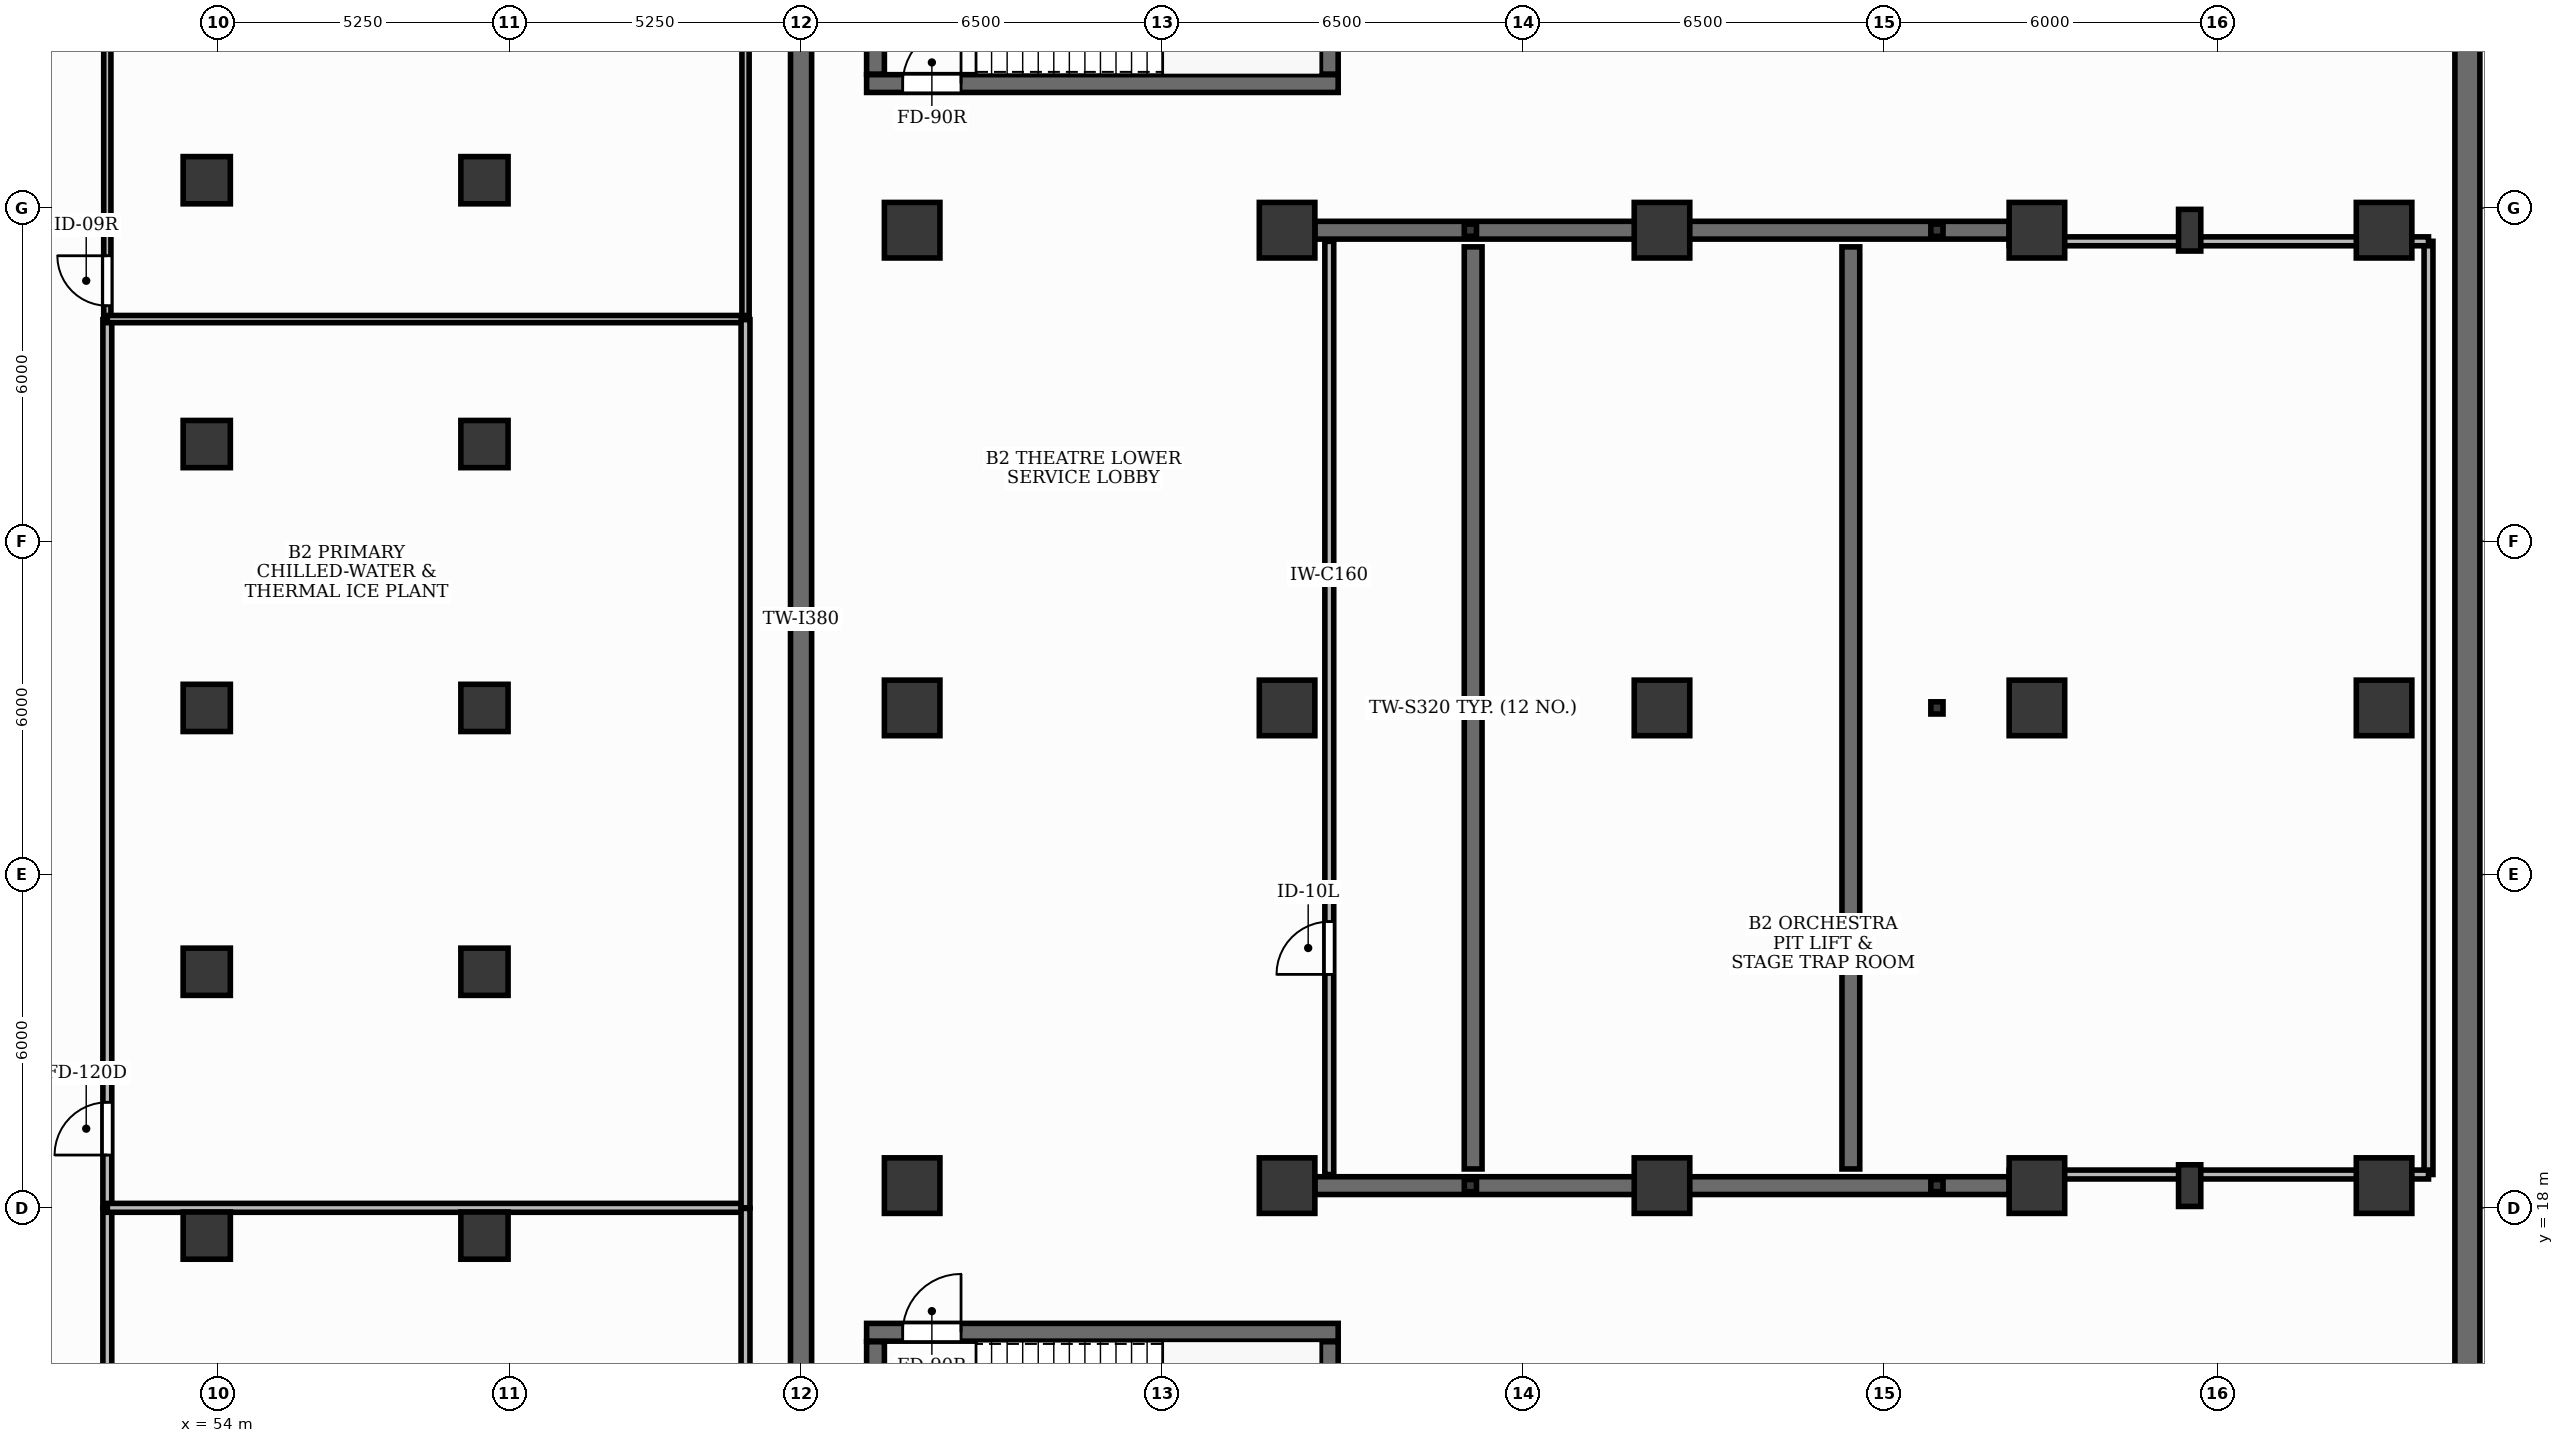
"""IFC4 building model, lengths in metres.
Left out: names, types, materials, properties, quantities, classifications, styles, units other than length and angle.
Written with IfcOpenShell. Run it as: python <this file> out.ifc"""

import sys

from ifc_helpers import new_model, si_unit, direction, frame, frame_2d, origin, origin_2d, place, context, subcontext, project, spatial, rectangle, hollow_circle, i_section, extrude, element, fill, save


model = new_model("IFC4")
c1 = context("Model", 3, precision=1e-05, world=origin(), true_north=direction((0.0, 1.0)))
c2 = subcontext(c1, "Body", "Model", "MODEL_VIEW")
j1 = project(units=[si_unit("LENGTHUNIT", "METRE"), si_unit("PLANEANGLEUNIT", "RADIAN")], contexts=[c1])
p1 = place(None, origin())
s1 = spatial("IfcSite", under=j1, at=p1, CompositionType="ELEMENT")
p2 = place(p1, origin())
s2 = spatial("IfcBuilding", under=s1, at=p2, CompositionType="ELEMENT")
p3 = place(p2, frame((0.0, 0.0, -9.0)))
s3 = spatial("IfcBuildingStorey", under=s2, at=p3, CompositionType="ELEMENT", Elevation=-9.0)
p4 = place(p3, frame((94.5, 50.75, 0.0), z_axis=(0.0, 0.0, 1.0), x_axis=(0.0, -1.0, 0.0)))
e1 = element("IfcWall", 1, at=p4, inside=s3, PredefinedType="USERDEFINED", context=c2, shape_type="SweptSolid", body=[
    extrude(rectangle(XDim=47.5, YDim=0.45, at=frame_2d((23.75, 0.0))), origin(), (0.0, 0.0, 1.0), 4.18),
])
for number, where, z_axis, x_axis in (
    (2, (66.5, 18.4, 0.0), (0.0, 0.0, 1.0), (1.0, 0.0, 0.0)),
    (3, (66.5, 27.0, 0.0), (0.0, 0.0, 1.0), (1.0, 0.0, 0.0)),
    (4, (66.5, 35.6, 0.0), (0.0, 0.0, 1.0), (1.0, 0.0, 0.0)),
    (5, (73.25, 18.4, 0.0), (0.0, 0.0, 1.0), (1.0, 0.0, 0.0)),
    (6, (73.25, 27.0, 0.0), (0.0, 0.0, 1.0), (1.0, 0.0, 0.0)),
    (7, (73.25, 35.6, 0.0), (0.0, 0.0, 1.0), (1.0, 0.0, 0.0)),
    (8, (80.0, 18.4, 0.0), (0.0, 0.0, 1.0), (1.0, 0.0, 0.0)),
    (9, (80.0, 27.0, 0.0), (0.0, 0.0, 1.0), (1.0, 0.0, 0.0)),
    (10, (80.0, 35.6, 0.0), (0.0, 0.0, 1.0), (1.0, 0.0, 0.0)),
    (11, (86.75, 18.4, 0.0), (0.0, 0.0, 1.0), (1.0, 0.0, 0.0)),
    (12, (86.75, 27.0, 0.0), (0.0, 0.0, 1.0), (1.0, 0.0, 0.0)),
    (13, (86.75, 35.6, 0.0), (0.0, 0.0, 1.0), (1.0, 0.0, 0.0)),
    (14, (93.0, 18.4, 0.0), (0.0, 0.0, 1.0), (1.0, 0.0, 0.0)),
    (15, (93.0, 27.0, 0.0), (0.0, 0.0, 1.0), (1.0, 0.0, 0.0)),
    (16, (93.0, 35.6, 0.0), (0.0, 0.0, 1.0), (1.0, 0.0, 0.0)),
):
    element("IfcColumn", number, at=place(p3, frame(where, z_axis=z_axis, x_axis=x_axis)), inside=s3, PredefinedType="COLUMN", context=c2, shape_type="SweptSolid", body=[
        extrude(rectangle(XDim=1.0, YDim=1.0, at=origin_2d()), origin(), (0.0, 0.0, 1.0), 4.18),
    ])
for number, where, z_axis, x_axis in (
    (17, (89.5, 18.4, 0.0), (0.0, 0.0, 1.0), (1.0, 0.0, 0.0)),
    (18, (89.5, 35.6, 0.0), (0.0, 0.0, 1.0), (1.0, 0.0, 0.0)),
):
    element("IfcColumn", number, at=place(p3, frame(where, z_axis=z_axis, x_axis=x_axis)), inside=s3, PredefinedType="COLUMN", context=c2, shape_type="SweptSolid", body=[
        extrude(i_section(OverallWidth=0.4, OverallDepth=0.75, WebThickness=0.016, FlangeThickness=0.028, at=origin_2d()), origin(), (0.0, 0.0, 1.0), 4.18),
    ])
for number, where, z_axis, x_axis in (
    (19, (84.95, 18.4, 0.0), (0.0, 0.0, 1.0), (1.0, 0.0, 0.0)),
    (20, (76.55, 18.4, 0.0), (0.0, 0.0, 1.0), (1.0, 0.0, 0.0)),
    (21, (84.95, 27.0, 0.0), (0.0, 0.0, 1.0), (1.0, 0.0, 0.0)),
    (22, (76.55, 27.0, 0.0), (0.0, 0.0, 1.0), (1.0, 0.0, 0.0)),
    (23, (84.95, 35.6, 0.0), (0.0, 0.0, 1.0), (1.0, 0.0, 0.0)),
    (24, (76.55, 35.6, 0.0), (0.0, 0.0, 1.0), (1.0, 0.0, 0.0)),
):
    element("IfcColumn", number, at=place(p3, frame(where, z_axis=z_axis, x_axis=x_axis)), inside=s3, PredefinedType="COLUMN", context=c2, shape_type="SweptSolid", body=[
        extrude(hollow_circle(Radius=0.11, WallThickness=0.012, at=origin_2d()), origin(), (0.0, 0.0, 1.0), 4.18),
    ])
p5 = place(p3, frame((64.5, 10.45, 0.0), z_axis=(0.0, 0.0, 1.0), x_axis=(0.0, 1.0, 0.0)))
e25 = element("IfcWall", 25, at=p5, inside=s3, PredefinedType="SHEAR", context=c2, shape_type="SweptSolid", body=[
    extrude(rectangle(XDim=36.3, YDim=0.38, at=frame_2d((18.15, 0.0))), origin(), (0.0, 0.0, 1.0), 4.18),
])
for number, where, z_axis, x_axis in (
    (26, (73.75, 18.4, 0.0), (0.0, 0.0, 1.0), (1.0, 0.0, 0.0)),
    (27, (73.75, 35.6, 0.0), (0.0, 0.0, 1.0), (1.0, 0.0, 0.0)),
):
    element("IfcWall", number, at=place(p3, frame(where, z_axis=z_axis, x_axis=x_axis)), inside=s3, PredefinedType="SHEAR", context=c2, shape_type="SweptSolid", body=[
        extrude(rectangle(XDim=12.5, YDim=0.32, at=frame_2d((6.25, 0.0))), origin(), (0.0, 0.0, 1.0), 4.18),
    ])
for number, where, z_axis, x_axis in (
    (28, (76.6, 18.7, 0.0), (0.0, 0.0, 1.0), (0.0, 1.0, 0.0)),
    (29, (83.4, 18.7, 0.0), (0.0, 0.0, 1.0), (0.0, 1.0, 0.0)),
):
    element("IfcWall", number, at=place(p3, frame(where, z_axis=z_axis, x_axis=x_axis)), inside=s3, PredefinedType="SHEAR", context=c2, shape_type="SweptSolid", body=[
        extrude(rectangle(XDim=16.6, YDim=0.32, at=frame_2d((8.3, 0.0))), origin(), (0.0, 0.0, 1.0), 4.18),
    ])
p6 = place(p3, frame((65.68, 15.76, 0.0), z_axis=(0.0, 0.0, 1.0), x_axis=(1.0, 0.0, 0.0)))
e30 = element("IfcWall", 30, at=p6, inside=s3, PredefinedType="SHEAR", context=c2, shape_type="SweptSolid", body=[
    extrude(rectangle(XDim=8.49, YDim=0.32, at=frame_2d((4.245, 0.0))), origin(), (0.0, 0.0, 1.0), 4.18),
])
p7 = place(p6, frame((0.65, 0.0, 0.0)))
e31 = element("IfcOpeningElement", 31, at=p7, cuts=e30, PredefinedType="OPENING", context=c2, shape_type="SweptSolid", body=[
    extrude(rectangle(XDim=1.05, YDim=2.15, at=frame_2d((0.525, 1.075))), frame((0.0, 0.175, 0.0), z_axis=(0.0, -1.0, 0.0), x_axis=(1.0, 0.0, 0.0)), (0.0, 0.0, 1.0), 0.35),
])
for number, where, z_axis, x_axis in (
    (32, (74.01, 12.11, 0.0), (0.0, 0.0, 1.0), (0.0, 1.0, 0.0)),
    (33, (65.84, 12.11, 0.0), (0.0, 0.0, 1.0), (0.0, 1.0, 0.0)),
):
    element("IfcWall", number, at=place(p3, frame(where, z_axis=z_axis, x_axis=x_axis)), inside=s3, PredefinedType="SHEAR", context=c2, shape_type="SweptSolid", body=[
        extrude(rectangle(XDim=3.48, YDim=0.32, at=frame_2d((1.74, 0.0))), origin(), (0.0, 0.0, 1.0), 4.18),
    ])
p8 = place(p3, frame((65.68, 38.24, 0.0), z_axis=(0.0, 0.0, 1.0), x_axis=(1.0, 0.0, 0.0)))
e34 = element("IfcWall", 34, at=p8, inside=s3, PredefinedType="SHEAR", context=c2, shape_type="SweptSolid", body=[
    extrude(rectangle(XDim=8.49, YDim=0.32, at=frame_2d((4.245, 0.0))), origin(), (0.0, 0.0, 1.0), 4.18),
])
p9 = place(p8, frame((0.65, 0.0, 0.0)))
e35 = element("IfcOpeningElement", 35, at=p9, cuts=e34, PredefinedType="OPENING", context=c2, shape_type="SweptSolid", body=[
    extrude(rectangle(XDim=1.05, YDim=2.15, at=frame_2d((0.525, 1.075))), frame((0.0, 0.175, 0.0), z_axis=(0.0, -1.0, 0.0), x_axis=(1.0, 0.0, 0.0)), (0.0, 0.0, 1.0), 0.35),
])
for number, where, z_axis, x_axis in (
    (36, (74.01, 38.41, 0.0), (0.0, 0.0, 1.0), (0.0, 1.0, 0.0)),
    (37, (65.84, 38.41, 0.0), (0.0, 0.0, 1.0), (0.0, 1.0, 0.0)),
):
    element("IfcWall", number, at=place(p3, frame(where, z_axis=z_axis, x_axis=x_axis)), inside=s3, PredefinedType="SHEAR", context=c2, shape_type="SweptSolid", body=[
        extrude(rectangle(XDim=3.48, YDim=0.32, at=frame_2d((1.74, 0.0))), origin(), (0.0, 0.0, 1.0), 4.18),
    ])
for number, where, z_axis, x_axis in (
    (38, (58.8, 17.5, 0.0), (0.0, 0.0, 1.0), (1.0, 0.0, 0.0)),
    (39, (53.8, 17.5, 0.0), (0.0, 0.0, 1.0), (1.0, 0.0, 0.0)),
    (40, (58.8, 22.25, 0.0), (0.0, 0.0, 1.0), (1.0, 0.0, 0.0)),
    (41, (53.8, 22.25, 0.0), (0.0, 0.0, 1.0), (1.0, 0.0, 0.0)),
    (42, (58.8, 27.0, 0.0), (0.0, 0.0, 1.0), (1.0, 0.0, 0.0)),
    (43, (53.8, 27.0, 0.0), (0.0, 0.0, 1.0), (1.0, 0.0, 0.0)),
    (44, (58.8, 31.75, 0.0), (0.0, 0.0, 1.0), (1.0, 0.0, 0.0)),
    (45, (53.8, 31.75, 0.0), (0.0, 0.0, 1.0), (1.0, 0.0, 0.0)),
    (46, (58.8, 36.5, 0.0), (0.0, 0.0, 1.0), (1.0, 0.0, 0.0)),
    (47, (53.8, 36.5, 0.0), (0.0, 0.0, 1.0), (1.0, 0.0, 0.0)),
):
    element("IfcColumn", number, at=place(p3, frame(where, z_axis=z_axis, x_axis=x_axis)), inside=s3, PredefinedType="COLUMN", context=c2, shape_type="SweptSolid", body=[
        extrude(rectangle(XDim=0.85, YDim=0.85, at=origin_2d()), origin(), (0.0, 0.0, 1.0), 4.18),
    ])
p10 = place(p3, frame((52.01, 34.0, 0.0), z_axis=(0.0, 0.0, 1.0), x_axis=(0.0, 1.0, 0.0)))
e48 = element("IfcWall", 48, at=p10, inside=s3, PredefinedType="PARTITIONING", context=c2, shape_type="SweptSolid", body=[
    extrude(rectangle(XDim=8.0, YDim=0.13, at=frame_2d((4.0, 0.0))), origin(), (0.0, 0.0, 1.0), 3.04),
])
p11 = place(p10, frame((0.24, 0.0, 0.0)))
e49 = element("IfcOpeningElement", 49, at=p11, cuts=e48, PredefinedType="OPENING", context=c2, shape_type="SweptSolid", body=[
    extrude(rectangle(XDim=0.9, YDim=2.15, at=frame_2d((0.45, 1.075))), frame((0.0, 0.08, 0.0), z_axis=(0.0, -1.0, 0.0), x_axis=(1.0, 0.0, 0.0)), (0.0, 0.0, 1.0), 0.16),
])
p12 = place(p3, frame((52.01, 18.0, 0.0), z_axis=(0.0, 0.0, 1.0), x_axis=(0.0, 1.0, 0.0)))
e50 = element("IfcWall", 50, at=p12, inside=s3, PredefinedType="PARTITIONING", context=c2, shape_type="SweptSolid", body=[
    extrude(rectangle(XDim=15.99, YDim=0.16, at=frame_2d((7.995, 0.0))), origin(), (0.0, 0.0, 1.0), 3.04),
])
p13 = place(p12, frame((0.95, 0.0, 0.0)))
e51 = element("IfcOpeningElement", 51, at=p13, cuts=e50, PredefinedType="OPENING", context=c2, shape_type="SweptSolid", body=[
    extrude(rectangle(XDim=0.95, YDim=2.15, at=frame_2d((0.475, 1.075))), frame((0.0, 0.095, 0.0), z_axis=(0.0, -1.0, 0.0), x_axis=(1.0, 0.0, 0.0)), (0.0, 0.0, 1.0), 0.19),
])
p14 = place(p3, frame((52.01, 11.0, 0.0), z_axis=(0.0, 0.0, 1.0), x_axis=(0.0, 1.0, 0.0)))
e52 = element("IfcWall", 52, at=p14, inside=s3, PredefinedType="PARTITIONING", context=c2, shape_type="SweptSolid", body=[
    extrude(rectangle(XDim=6.99, YDim=0.16, at=frame_2d((3.495, 0.0))), origin(), (0.0, 0.0, 1.0), 3.04),
])
p15 = place(p14, frame((1.54, 0.0, 0.0)))
e53 = element("IfcOpeningElement", 53, at=p15, cuts=e52, PredefinedType="OPENING", context=c2, shape_type="SweptSolid", body=[
    extrude(rectangle(XDim=0.95, YDim=2.15, at=frame_2d((0.475, 1.075))), frame((0.0, 0.095, 0.0), z_axis=(0.0, -1.0, 0.0), x_axis=(1.0, 0.0, 0.0)), (0.0, 0.0, 1.0), 0.19),
])
p16 = place(p3, frame((74.01, 18.6, 0.0), z_axis=(0.0, 0.0, 1.0), x_axis=(0.0, 1.0, 0.0)))
e54 = element("IfcWall", 54, at=p16, inside=s3, PredefinedType="PARTITIONING", context=c2, shape_type="SweptSolid", body=[
    extrude(rectangle(XDim=16.8, YDim=0.16, at=frame_2d((8.4, 0.0))), origin(), (0.0, 0.0, 1.0), 3.04),
])
p17 = place(p16, frame((3.603, 0.0, 0.0)))
e55 = element("IfcOpeningElement", 55, at=p17, cuts=e54, PredefinedType="OPENING", context=c2, shape_type="SweptSolid", body=[
    extrude(rectangle(XDim=0.95, YDim=2.15, at=frame_2d((0.475, 1.075))), frame((0.0, 0.095, 0.0), z_axis=(0.0, -1.0, 0.0), x_axis=(1.0, 0.0, 0.0)), (0.0, 0.0, 1.0), 0.19),
])
p18 = place(p3, frame((63.5, 50.0, 0.0), z_axis=(0.0, 0.0, 1.0), x_axis=(0.0, -1.0, 0.0)))
e56 = element("IfcWall", 56, at=p18, inside=s3, PredefinedType="PARTITIONING", context=c2, shape_type="SweptSolid", body=[
    extrude(rectangle(XDim=16.0, YDim=0.13, at=frame_2d((8.0, 0.0))), origin(), (0.0, 0.0, 1.0), 3.04),
])
p19 = place(p3, frame((63.5, 34.0, 0.0), z_axis=(0.0, 0.0, 1.0), x_axis=(-1.0, 0.0, 0.0)))
e57 = element("IfcWall", 57, at=p19, inside=s3, PredefinedType="PARTITIONING", context=c2, shape_type="SweptSolid", body=[
    extrude(rectangle(XDim=11.49, YDim=0.13, at=frame_2d((5.745, 0.0))), origin(), (0.0, 0.0, 1.0), 3.04),
])
p20 = place(p3, frame((63.5, 18.0, 0.0), z_axis=(0.0, 0.0, 1.0), x_axis=(-1.0, 0.0, 0.0)))
e58 = element("IfcWall", 58, at=p20, inside=s3, PredefinedType="PARTITIONING", context=c2, shape_type="SweptSolid", body=[
    extrude(rectangle(XDim=11.49, YDim=0.16, at=frame_2d((5.745, 0.0))), origin(), (0.0, 0.0, 1.0), 3.04),
])
p21 = place(p3, frame((63.5, 33.99, 0.0), z_axis=(0.0, 0.0, 1.0), x_axis=(0.0, -1.0, 0.0)))
e59 = element("IfcWall", 59, at=p21, inside=s3, PredefinedType="PARTITIONING", context=c2, shape_type="SweptSolid", body=[
    extrude(rectangle(XDim=15.99, YDim=0.16, at=frame_2d((7.995, 0.0))), origin(), (0.0, 0.0, 1.0), 3.04),
])
p22 = place(p3, frame((63.5, 17.99, 0.0), z_axis=(0.0, 0.0, 1.0), x_axis=(0.0, -1.0, 0.0)))
e60 = element("IfcWall", 60, at=p22, inside=s3, PredefinedType="PARTITIONING", context=c2, shape_type="SweptSolid", body=[
    extrude(rectangle(XDim=7.39, YDim=0.16, at=frame_2d((3.695, 0.0))), origin(), (0.0, 0.0, 1.0), 3.04),
])
p23 = place(p3, frame((93.8, 35.4, 0.0), z_axis=(0.0, 0.0, 1.0), x_axis=(0.0, -1.0, 0.0)))
e61 = element("IfcWall", 61, at=p23, inside=s3, PredefinedType="PARTITIONING", context=c2, shape_type="SweptSolid", body=[
    extrude(rectangle(XDim=16.8, YDim=0.16, at=frame_2d((8.4, 0.0))), origin(), (0.0, 0.0, 1.0), 3.04),
])
for number, where, z_axis, x_axis in (
    (62, (93.8, 18.6, 0.0), (0.0, 0.0, 1.0), (-1.0, 0.0, 0.0)),
    (63, (86.25, 35.4, 0.0), (0.0, 0.0, 1.0), (1.0, 0.0, 0.0)),
):
    element("IfcWall", number, at=place(p3, frame(where, z_axis=z_axis, x_axis=x_axis)), inside=s3, PredefinedType="PARTITIONING", context=c2, shape_type="SweptSolid", body=[
        extrude(rectangle(XDim=7.55, YDim=0.16, at=frame_2d((3.775, 0.0))), origin(), (0.0, 0.0, 1.0), 3.04),
    ])
p24 = place(p7, origin())
e64 = element("IfcDoor", 64, at=p24, inside=s3, OperationType="SINGLE_SWING_RIGHT", PredefinedType="DOOR", context=c2, shape_type="SweptSolid", body=[
    extrude(rectangle(XDim=1.05, YDim=2.15, at=frame_2d((0.525, 1.075))), frame((0.0, 0.025, 0.0), z_axis=(0.0, -1.0, 0.0), x_axis=(1.0, 0.0, 0.0)), (0.0, 0.0, 1.0), 0.05),
])
fill(e31, e64)
p25 = place(p9, origin())
e65 = element("IfcDoor", 65, at=p25, inside=s3, OperationType="SINGLE_SWING_RIGHT", PredefinedType="DOOR", context=c2, shape_type="SweptSolid", body=[
    extrude(rectangle(XDim=1.05, YDim=2.15, at=frame_2d((0.525, 1.075))), frame((0.0, 0.025, 0.0), z_axis=(0.0, -1.0, 0.0), x_axis=(1.0, 0.0, 0.0)), (0.0, 0.0, 1.0), 0.05),
])
fill(e35, e65)
p26 = place(p11, origin())
e66 = element("IfcDoor", 66, at=p26, inside=s3, OperationType="SINGLE_SWING_RIGHT", PredefinedType="DOOR", context=c2, shape_type="SweptSolid", body=[
    extrude(rectangle(XDim=0.9, YDim=2.15, at=frame_2d((0.45, 1.075))), frame((0.0, 0.025, 0.0), z_axis=(0.0, -1.0, 0.0), x_axis=(1.0, 0.0, 0.0)), (0.0, 0.0, 1.0), 0.05),
])
fill(e49, e66)
p27 = place(p13, origin())
e67 = element("IfcDoor", 67, at=p27, inside=s3, OperationType="SINGLE_SWING_LEFT", PredefinedType="DOOR", context=c2, shape_type="SweptSolid", body=[
    extrude(rectangle(XDim=0.95, YDim=2.15, at=frame_2d((0.475, 1.075))), frame((0.0, 0.025, 0.0), z_axis=(0.0, -1.0, 0.0), x_axis=(1.0, 0.0, 0.0)), (0.0, 0.0, 1.0), 0.05),
])
fill(e51, e67)
p28 = place(p17, origin())
e68 = element("IfcDoor", 68, at=p28, inside=s3, OperationType="SINGLE_SWING_LEFT", PredefinedType="DOOR", context=c2, shape_type="SweptSolid", body=[
    extrude(rectangle(XDim=0.95, YDim=2.15, at=frame_2d((0.475, 1.075))), frame((0.0, 0.025, 0.0), z_axis=(0.0, -1.0, 0.0), x_axis=(1.0, 0.0, 0.0)), (0.0, 0.0, 1.0), 0.05),
])
fill(e55, e68)
save(model, sys.argv[1])
